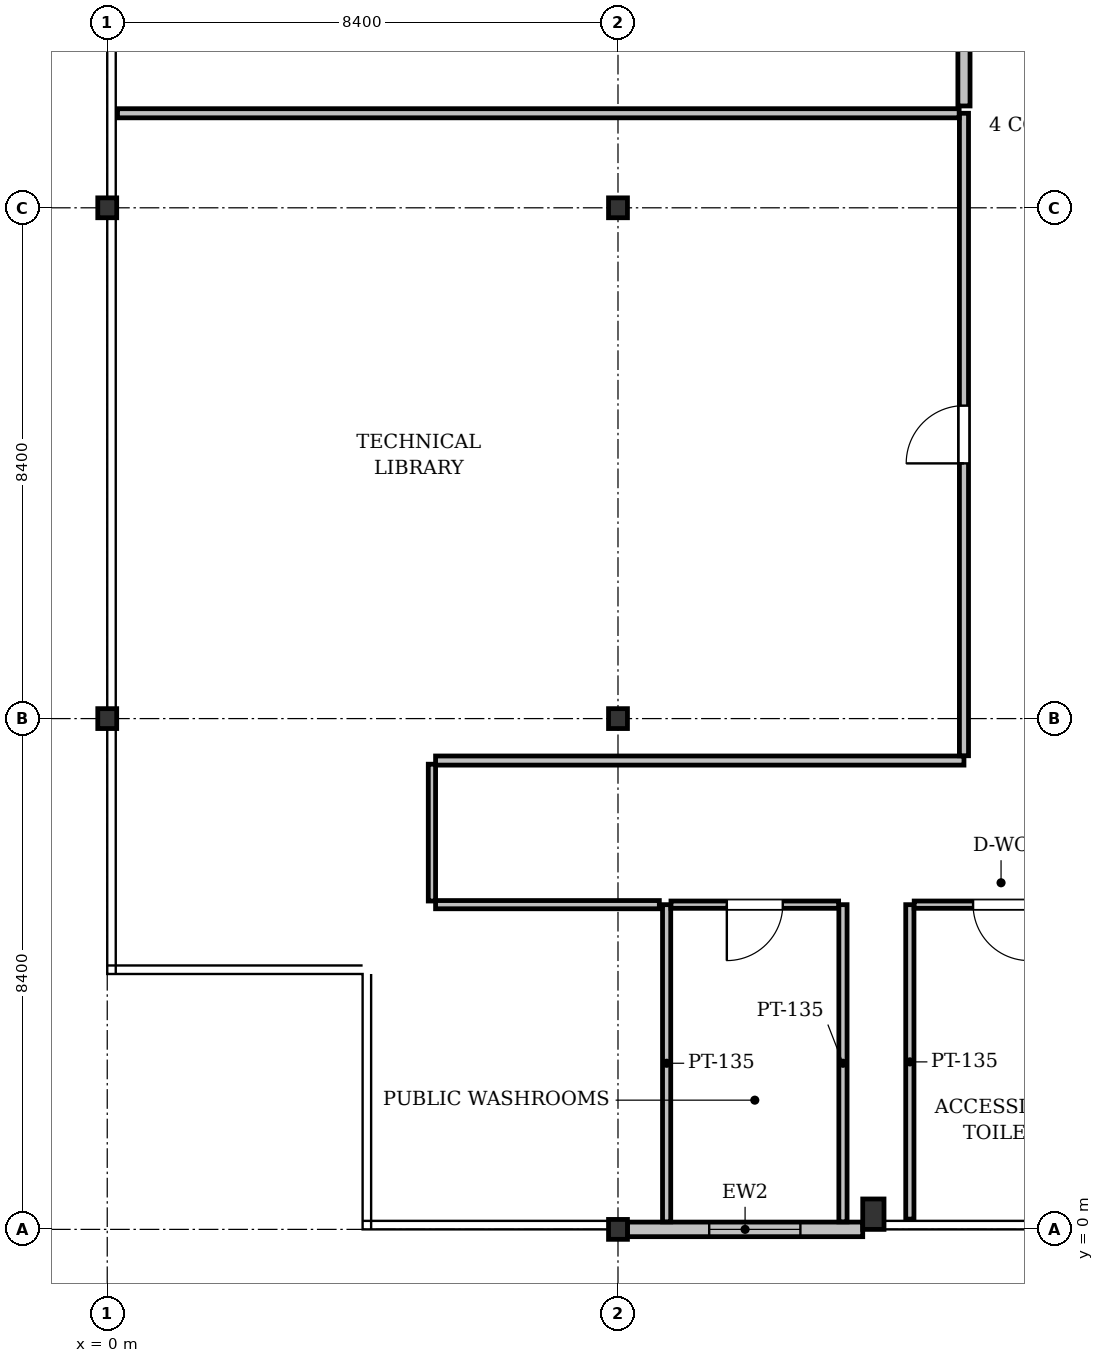
"""IFC4 building model, lengths in metres.
Left out: names, types, materials, properties, quantities, classifications, styles, units other than length and angle.
Written with IfcOpenShell. Run it as: python <this file> out.ifc"""

import sys

from ifc_helpers import new_model, si_unit, direction, frame, frame_2d, origin, origin_2d, place, context, subcontext, project, spatial, rectangle, i_section, extrude, element, fill, save


model = new_model("IFC4")
c1 = context("Model", 3, precision=1e-05, world=origin(), true_north=direction((0.0, 1.0)))
c2 = subcontext(c1, "Body", "Model", "MODEL_VIEW")
j1 = project(units=[si_unit("LENGTHUNIT", "METRE"), si_unit("PLANEANGLEUNIT", "RADIAN")], contexts=[c1])
p1 = place(None, origin())
s1 = spatial("IfcSite", under=j1, at=p1, CompositionType="ELEMENT")
p2 = place(p1, origin())
s2 = spatial("IfcBuilding", under=s1, at=p2, CompositionType="ELEMENT")
p3 = place(p2, frame((0.0, 0.0, 250.2)))
s3 = spatial("IfcBuildingStorey", under=s2, at=p3, CompositionType="ELEMENT", Elevation=250.2)
for number, where, z_axis, x_axis in (
    (1, (0.0, 8.4, 0.0), (0.0, 0.0, 1.0), (1.0, 0.0, 0.0)),
    (2, (0.0, 16.8, 0.0), (0.0, 0.0, 1.0), (1.0, 0.0, 0.0)),
    (3, (8.4, 0.0, 0.0), (0.0, 0.0, 1.0), (1.0, 0.0, 0.0)),
    (4, (8.4, 8.4, 0.0), (0.0, 0.0, 1.0), (1.0, 0.0, 0.0)),
    (5, (8.4, 16.8, 0.0), (0.0, 0.0, 1.0), (1.0, 0.0, 0.0)),
):
    element("IfcColumn", number, at=place(p3, frame(where, z_axis=z_axis, x_axis=x_axis)), inside=s3, PredefinedType="COLUMN", context=c2, shape_type="SweptSolid", body=[
        extrude(i_section(OverallWidth=0.311, OverallDepth=0.327, WebThickness=0.016, FlangeThickness=0.025, FilletRadius=0.017, at=origin_2d()), origin(), (0.0, 0.0, 1.0), 4.0),
    ])
p4 = place(p3, frame((12.6, 0.25, 0.0), z_axis=(0.0, 0.0, 1.0), x_axis=(1.0, 0.0, 0.0)))
e6 = element("IfcColumn", 6, at=p4, inside=s3, PredefinedType="PILASTER", context=c2, shape_type="SweptSolid", body=[
    extrude(rectangle(XDim=0.35, YDim=0.5, at=origin_2d()), origin(), (0.0, 0.0, 1.0), 4.0),
])
p5 = place(p3, frame((12.425, 0.0, 0.0), z_axis=(0.0, 0.0, 1.0), x_axis=(-1.0, 0.0, 0.0)))
e7 = element("IfcWall", 7, at=p5, inside=s3, PredefinedType="STANDARD", context=c2, shape_type="SweptSolid", body=[
    extrude(rectangle(XDim=3.87, YDim=0.24, at=frame_2d((1.935, 0.0))), origin(), (0.0, 0.0, 1.0), 3.475),
])
p6 = place(p5, frame((1.025, 0.0, 0.9)))
e8 = element("IfcOpeningElement", 8, at=p6, cuts=e7, PredefinedType="OPENING", context=c2, shape_type="SweptSolid", body=[
    extrude(rectangle(XDim=1.5, YDim=1.6, at=frame_2d((0.75, 0.8))), frame((0.0, 0.13, 0.0), z_axis=(0.0, -1.0, 0.0), x_axis=(1.0, 0.0, 0.0)), (0.0, 0.0, 1.0), 0.26),
])
p7 = place(p3, frame((13.2, 5.34, 0.0), z_axis=(0.0, 0.0, 1.0), x_axis=(0.0, -1.0, 0.0)))
e9 = element("IfcWall", 9, at=p7, inside=s3, PredefinedType="PARTITIONING", context=c2, shape_type="SweptSolid", body=[
    extrude(rectangle(XDim=5.171, YDim=0.135, at=frame_2d((2.585, 0.0))), origin(), (0.0, 0.0, 1.0), 3.725),
])
p8 = place(p3, frame((16.128, 5.34, 0.0), z_axis=(0.0, 0.0, 1.0), x_axis=(-1.0, 0.0, 0.0)))
e10 = element("IfcWall", 10, at=p8, inside=s3, PredefinedType="PARTITIONING", context=c2, shape_type="SweptSolid", body=[
    extrude(rectangle(XDim=2.857, YDim=0.12, at=frame_2d((1.428, 0.0))), origin(), (0.0, 0.0, 1.0), 3.725),
])
p9 = place(p8, frame((0.969, 0.0, 0.0)))
e11 = element("IfcOpeningElement", 11, at=p9, cuts=e10, PredefinedType="OPENING", context=c2, shape_type="SweptSolid", body=[
    extrude(rectangle(XDim=0.92, YDim=2.1, at=frame_2d((0.46, 1.05))), frame((0.0, 0.07, 0.0), z_axis=(0.0, -1.0, 0.0), x_axis=(1.0, 0.0, 0.0)), (0.0, 0.0, 1.0), 0.14),
])
for number, where, z_axis, x_axis in (
    (12, (9.2, 5.34, 0.0), (0.0, 0.0, 1.0), (0.0, -1.0, 0.0)),
    (13, (12.1, 0.124, 0.0), (0.0, 0.0, 1.0), (0.0, 1.0, 0.0)),
):
    element("IfcWall", number, at=place(p3, frame(where, z_axis=z_axis, x_axis=x_axis)), inside=s3, PredefinedType="PARTITIONING", context=c2, shape_type="SweptSolid", body=[
        extrude(rectangle(XDim=5.216, YDim=0.135, at=frame_2d((2.608, 0.0))), origin(), (0.0, 0.0, 1.0), 3.725),
    ])
p10 = place(p3, frame((12.029, 5.34, 0.0), z_axis=(0.0, 0.0, 1.0), x_axis=(-1.0, 0.0, 0.0)))
e14 = element("IfcWall", 14, at=p10, inside=s3, PredefinedType="PARTITIONING", context=c2, shape_type="SweptSolid", body=[
    extrude(rectangle(XDim=2.757, YDim=0.12, at=frame_2d((1.378, 0.0))), origin(), (0.0, 0.0, 1.0), 3.725),
])
p11 = place(p10, frame((0.918, 0.0, 0.0)))
e15 = element("IfcOpeningElement", 15, at=p11, cuts=e14, PredefinedType="OPENING", context=c2, shape_type="SweptSolid", body=[
    extrude(rectangle(XDim=0.92, YDim=2.1, at=frame_2d((0.46, 1.05))), frame((0.0, 0.07, 0.0), z_axis=(0.0, -1.0, 0.0), x_axis=(1.0, 0.0, 0.0)), (0.0, 0.0, 1.0), 0.14),
])
p12 = place(p3, frame((5.4, 7.71, 0.0), z_axis=(0.0, 0.0, 1.0), x_axis=(1.0, 0.0, 0.0)))
e16 = element("IfcWall", 16, at=p12, inside=s3, PredefinedType="PARTITIONING", context=c2, shape_type="SweptSolid", body=[
    extrude(rectangle(XDim=8.69, YDim=0.15, at=frame_2d((4.345, 0.0))), origin(), (0.0, 0.0, 1.0), 3.319),
])
p13 = place(p3, frame((14.09, 7.789, 0.0), z_axis=(0.0, 0.0, 1.0), x_axis=(0.0, 1.0, 0.0)))
e17 = element("IfcWall", 17, at=p13, inside=s3, PredefinedType="PARTITIONING", context=c2, shape_type="SweptSolid", body=[
    extrude(rectangle(XDim=10.566, YDim=0.15, at=frame_2d((5.283, 0.0))), origin(), (0.0, 0.0, 1.0), 3.271),
])
p14 = place(p13, frame((4.808, 0.0, 0.0)))
e18 = element("IfcOpeningElement", 18, at=p14, cuts=e17, PredefinedType="OPENING", context=c2, shape_type="SweptSolid", body=[
    extrude(rectangle(XDim=0.95, YDim=2.15, at=frame_2d((0.475, 1.075))), frame((0.0, 0.085, 0.0), z_axis=(0.0, -1.0, 0.0), x_axis=(1.0, 0.0, 0.0)), (0.0, 0.0, 1.0), 0.17),
])
p15 = place(p3, frame((14.011, 18.355, 0.0), z_axis=(0.0, 0.0, 1.0), x_axis=(-1.0, 0.0, 0.0)))
e19 = element("IfcWall", 19, at=p15, inside=s3, PredefinedType="PARTITIONING", context=c2, shape_type="SweptSolid", body=[
    extrude(rectangle(XDim=13.842, YDim=0.15, at=frame_2d((6.921, 0.0))), origin(), (0.0, 0.0, 1.0), 3.319),
])
p16 = place(p3, frame((9.08, 5.34, 0.0), z_axis=(0.0, 0.0, 1.0), x_axis=(-1.0, 0.0, 0.0)))
e20 = element("IfcWall", 20, at=p16, inside=s3, PredefinedType="PARTITIONING", context=c2, shape_type="SweptSolid", body=[
    extrude(rectangle(XDim=3.68, YDim=0.135, at=frame_2d((1.84, 0.0))), origin(), (0.0, 0.0, 1.0), 3.319),
])
p17 = place(p3, frame((5.34, 5.4, 0.0), z_axis=(0.0, 0.0, 1.0), x_axis=(0.0, 1.0, 0.0)))
e21 = element("IfcWall", 21, at=p17, inside=s3, PredefinedType="PARTITIONING", context=c2, shape_type="SweptSolid", body=[
    extrude(rectangle(XDim=2.25, YDim=0.12, at=frame_2d((1.125, 0.0))), origin(), (0.0, 0.0, 1.0), 3.725),
])
p18 = place(p3, frame((14.09, 18.475, 0.0), z_axis=(0.0, 0.0, 1.0), x_axis=(0.0, 1.0, 0.0)))
e22 = element("IfcWall", 22, at=p18, inside=s3, PredefinedType="PARTITIONING", context=c2, shape_type="SweptSolid", body=[
    extrude(rectangle(XDim=4.315, YDim=0.2, at=frame_2d((2.158, 0.0))), origin(), (0.0, 0.0, 1.0), 3.725),
])
p19 = place(p6, origin())
e23 = element("IfcWindow", 23, at=p19, inside=s3, PartitioningType="SINGLE_PANEL", PredefinedType="WINDOW", context=c2, shape_type="SweptSolid", body=[
    extrude(rectangle(XDim=1.5, YDim=1.6, at=frame_2d((0.75, 0.8))), frame((0.0, 0.03, 0.0), z_axis=(0.0, -1.0, 0.0), x_axis=(1.0, 0.0, 0.0)), (0.0, 0.0, 1.0), 0.06),
])
fill(e8, e23)
p20 = place(p9, origin())
e24 = element("IfcDoor", 24, at=p20, inside=s3, OperationType="SINGLE_SWING_LEFT", PredefinedType="DOOR", context=c2, shape_type="SweptSolid", body=[
    extrude(rectangle(XDim=0.92, YDim=2.1, at=frame_2d((0.46, 1.05))), frame((0.0, 0.025, 0.0), z_axis=(0.0, -1.0, 0.0), x_axis=(1.0, 0.0, 0.0)), (0.0, 0.0, 1.0), 0.05),
])
fill(e11, e24)
p21 = place(p11, origin())
e25 = element("IfcDoor", 25, at=p21, inside=s3, OperationType="SINGLE_SWING_RIGHT", PredefinedType="DOOR", context=c2, shape_type="SweptSolid", body=[
    extrude(rectangle(XDim=0.92, YDim=2.1, at=frame_2d((0.46, 1.05))), frame((0.0, 0.025, 0.0), z_axis=(0.0, -1.0, 0.0), x_axis=(1.0, 0.0, 0.0)), (0.0, 0.0, 1.0), 0.05),
])
fill(e15, e25)
p22 = place(p14, origin())
e26 = element("IfcDoor", 26, at=p22, inside=s3, OperationType="SINGLE_SWING_LEFT", PredefinedType="DOOR", context=c2, shape_type="SweptSolid", body=[
    extrude(rectangle(XDim=0.95, YDim=2.15, at=frame_2d((0.475, 1.075))), frame((0.0, 0.025, 0.0), z_axis=(0.0, -1.0, 0.0), x_axis=(1.0, 0.0, 0.0)), (0.0, 0.0, 1.0), 0.05),
])
fill(e18, e26)
save(model, sys.argv[1])
